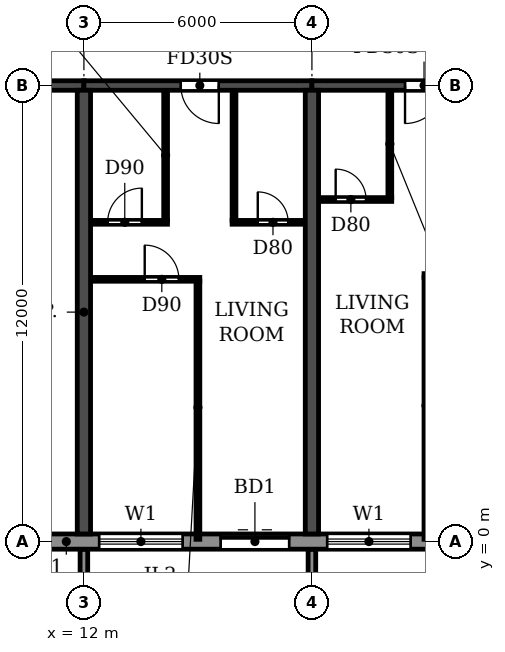
"""IFC4 building model, lengths in metres.
Left out: names, types, materials, properties, quantities, classifications, styles, units other than length and angle.
Written with IfcOpenShell. Run it as: python <this file> out.ifc"""

import sys

from ifc_helpers import new_model, si_unit, direction, frame, frame_2d, origin, place, context, subcontext, project, spatial, polyline, rectangle, outline, extrude, source, transform, mapped, element, fill, save


model = new_model("IFC4")
c1 = context("Model", 3, precision=1e-05, world=origin(), true_north=direction((0.0, 1.0)))
c2 = subcontext(c1, "Body", "Model", "MODEL_VIEW")
j1 = project(units=[si_unit("LENGTHUNIT", "METRE"), si_unit("PLANEANGLEUNIT", "RADIAN")], contexts=[c1])
p1 = place(None, origin())
s1 = spatial("IfcSite", under=j1, at=p1, CompositionType="ELEMENT")
p2 = place(p1, origin())
s2 = spatial("IfcBuilding", under=s1, at=p2, CompositionType="ELEMENT")
p3 = place(p2, frame((0.0, 0.0, 72.9)))
s3 = spatial("IfcBuildingStorey", under=s2, at=p3, CompositionType="ELEMENT", Elevation=72.9)
for number, where, z_axis, x_axis in (
    (1, (12.0, 0.2, 0.0), (0.0, 0.0, 1.0), (0.0, 1.0, 0.0)),
    (2, (18.0, 0.2, 0.0), (0.0, 0.0, 1.0), (0.0, 1.0, 0.0)),
):
    element("IfcWall", number, at=place(p3, frame(where, z_axis=z_axis, x_axis=x_axis)), inside=s3, PredefinedType="SHEAR", context=c2, shape_type="SweptSolid", body=[
        extrude(rectangle(XDim=11.675, YDim=0.35, at=frame_2d((5.837, 0.0))), origin(), (0.0, 0.0, 1.0), 3.06),
    ])
p4 = place(p3, frame((6.2, 12.0, 0.0), z_axis=(0.0, 0.0, 1.0), x_axis=(1.0, 0.0, 0.0)))
e3 = element("IfcWall", 3, at=p4, inside=s3, PredefinedType="SHEAR", context=c2, shape_type="SweptSolid", body=[
    extrude(rectangle(XDim=5.8, YDim=0.25, at=frame_2d((2.9, 0.0))), origin(), (0.0, 0.0, 1.0), 2.46),
])
p5 = place(p4, frame((2.3, 0.0, 0.0)))
e4 = element("IfcOpeningElement", 4, at=p5, cuts=e3, PredefinedType="OPENING", context=c2, shape_type="SweptSolid", body=[
    extrude(rectangle(XDim=1.0, YDim=2.1, at=frame_2d((0.5, 1.05))), frame((0.0, 0.135, 0.0), z_axis=(0.0, -1.0, 0.0), x_axis=(1.0, 0.0, 0.0)), (0.0, 0.0, 1.0), 0.27),
])
p6 = place(p3, frame((12.0, 12.0, 0.0), z_axis=(0.0, 0.0, 1.0), x_axis=(1.0, 0.0, 0.0)))
e5 = element("IfcWall", 5, at=p6, inside=s3, PredefinedType="SHEAR", context=c2, shape_type="SweptSolid", body=[
    extrude(rectangle(XDim=6.0, YDim=0.25, at=frame_2d((3.0, 0.0))), origin(), (0.0, 0.0, 1.0), 2.46),
])
p7 = place(p6, frame((2.55, 0.0, 0.0)))
e6 = element("IfcOpeningElement", 6, at=p7, cuts=e5, PredefinedType="OPENING", context=c2, shape_type="SweptSolid", body=[
    extrude(rectangle(XDim=1.0, YDim=2.1, at=frame_2d((0.5, 1.05))), frame((0.0, 0.135, 0.0), z_axis=(0.0, -1.0, 0.0), x_axis=(1.0, 0.0, 0.0)), (0.0, 0.0, 1.0), 0.27),
])
p8 = place(p3, frame((18.0, 12.0, 0.0), z_axis=(0.0, 0.0, 1.0), x_axis=(1.0, 0.0, 0.0)))
e7 = element("IfcWall", 7, at=p8, inside=s3, PredefinedType="SHEAR", context=c2, shape_type="SweptSolid", body=[
    extrude(rectangle(XDim=6.0, YDim=0.25, at=frame_2d((3.0, 0.0))), origin(), (0.0, 0.0, 1.0), 2.46),
])
p9 = place(p8, frame((2.45, 0.0, 0.0)))
e8 = element("IfcOpeningElement", 8, at=p9, cuts=e7, PredefinedType="OPENING", context=c2, shape_type="SweptSolid", body=[
    extrude(rectangle(XDim=1.0, YDim=2.1, at=frame_2d((0.5, 1.05))), frame((0.0, 0.135, 0.0), z_axis=(0.0, -1.0, 0.0), x_axis=(1.0, 0.0, 0.0)), (0.0, 0.0, 1.0), 0.27),
])
p10 = place(p3, frame((10.683, 0.0, 0.0), z_axis=(0.0, 0.0, 1.0), x_axis=(1.0, 0.0, 0.0)))
e9 = element("IfcWall", 9, at=p10, inside=s3, PredefinedType="STANDARD", context=c2, shape_type="SweptSolid", body=[
    extrude(rectangle(XDim=80.634, YDim=0.4, at=frame_2d((40.317, 0.0))), origin(), (0.0, 0.0, 1.0), 3.06),
])
p11 = place(p10, frame((1.717, 0.0, 0.9)))
e10 = element("IfcOpeningElement", 10, at=p11, cuts=e9, PredefinedType="OPENING", context=c2, shape_type="SweptSolid", body=[
    extrude(rectangle(XDim=2.2, YDim=1.5, at=frame_2d((1.1, 0.75))), frame((0.0, 0.21, 0.0), z_axis=(0.0, -1.0, 0.0), x_axis=(1.0, 0.0, 0.0)), (0.0, 0.0, 1.0), 0.42),
])
p12 = place(p10, frame((4.917, 0.0, 0.0)))
e11 = element("IfcOpeningElement", 11, at=p12, cuts=e9, PredefinedType="OPENING", context=c2, shape_type="SweptSolid", body=[
    extrude(rectangle(XDim=1.8, YDim=2.4, at=frame_2d((0.9, 1.2))), frame((0.0, 0.21, 0.0), z_axis=(0.0, -1.0, 0.0), x_axis=(1.0, 0.0, 0.0)), (0.0, 0.0, 1.0), 0.42),
])
p13 = place(p10, frame((7.717, 0.0, 0.9)))
e12 = element("IfcOpeningElement", 12, at=p13, cuts=e9, PredefinedType="OPENING", context=c2, shape_type="SweptSolid", body=[
    extrude(rectangle(XDim=2.2, YDim=1.5, at=frame_2d((1.1, 0.75))), frame((0.0, 0.21, 0.0), z_axis=(0.0, -1.0, 0.0), x_axis=(1.0, 0.0, 0.0)), (0.0, 0.0, 1.0), 0.42),
])
p14 = place(p10, frame((10.717, 0.0, 0.9)))
e13 = element("IfcOpeningElement", 13, at=p14, cuts=e9, PredefinedType="OPENING", context=c2, shape_type="SweptSolid", body=[
    extrude(rectangle(XDim=2.2, YDim=1.5, at=frame_2d((1.1, 0.75))), frame((0.0, 0.21, 0.0), z_axis=(0.0, -1.0, 0.0), x_axis=(1.0, 0.0, 0.0)), (0.0, 0.0, 1.0), 0.42),
])
p15 = place(p10, frame((13.717, 0.0, 0.9)))
e14 = element("IfcOpeningElement", 14, at=p15, cuts=e9, PredefinedType="OPENING", context=c2, shape_type="SweptSolid", body=[
    extrude(rectangle(XDim=2.2, YDim=1.5, at=frame_2d((1.1, 0.75))), frame((0.0, 0.21, 0.0), z_axis=(0.0, -1.0, 0.0), x_axis=(1.0, 0.0, 0.0)), (0.0, 0.0, 1.0), 0.42),
])
p16 = place(p10, frame((16.917, 0.0, 0.0)))
e15 = element("IfcOpeningElement", 15, at=p16, cuts=e9, PredefinedType="OPENING", context=c2, shape_type="SweptSolid", body=[
    extrude(rectangle(XDim=1.8, YDim=2.4, at=frame_2d((0.9, 1.2))), frame((0.0, 0.21, 0.0), z_axis=(0.0, -1.0, 0.0), x_axis=(1.0, 0.0, 0.0)), (0.0, 0.0, 1.0), 0.42),
])
p17 = place(p10, frame((19.717, 0.0, 0.9)))
e16 = element("IfcOpeningElement", 16, at=p17, cuts=e9, PredefinedType="OPENING", context=c2, shape_type="SweptSolid", body=[
    extrude(rectangle(XDim=2.2, YDim=1.5, at=frame_2d((1.1, 0.75))), frame((0.0, 0.21, 0.0), z_axis=(0.0, -1.0, 0.0), x_axis=(1.0, 0.0, 0.0)), (0.0, 0.0, 1.0), 0.42),
])
p18 = place(p10, frame((22.717, 0.0, 0.9)))
e17 = element("IfcOpeningElement", 17, at=p18, cuts=e9, PredefinedType="OPENING", context=c2, shape_type="SweptSolid", body=[
    extrude(rectangle(XDim=2.2, YDim=1.5, at=frame_2d((1.1, 0.75))), frame((0.0, 0.21, 0.0), z_axis=(0.0, -1.0, 0.0), x_axis=(1.0, 0.0, 0.0)), (0.0, 0.0, 1.0), 0.42),
])
p19 = place(p10, frame((25.917, 0.0, 0.0)))
e18 = element("IfcOpeningElement", 18, at=p19, cuts=e9, PredefinedType="OPENING", context=c2, shape_type="SweptSolid", body=[
    extrude(rectangle(XDim=1.8, YDim=2.4, at=frame_2d((0.9, 1.2))), frame((0.0, 0.21, 0.0), z_axis=(0.0, -1.0, 0.0), x_axis=(1.0, 0.0, 0.0)), (0.0, 0.0, 1.0), 0.42),
])
p20 = place(p10, frame((28.717, 0.0, 0.9)))
e19 = element("IfcOpeningElement", 19, at=p20, cuts=e9, PredefinedType="OPENING", context=c2, shape_type="SweptSolid", body=[
    extrude(rectangle(XDim=2.2, YDim=1.5, at=frame_2d((1.1, 0.75))), frame((0.0, 0.21, 0.0), z_axis=(0.0, -1.0, 0.0), x_axis=(1.0, 0.0, 0.0)), (0.0, 0.0, 1.0), 0.42),
])
p21 = place(p10, frame((31.717, 0.0, 0.9)))
e20 = element("IfcOpeningElement", 20, at=p21, cuts=e9, PredefinedType="OPENING", context=c2, shape_type="SweptSolid", body=[
    extrude(rectangle(XDim=2.2, YDim=1.5, at=frame_2d((1.1, 0.75))), frame((0.0, 0.21, 0.0), z_axis=(0.0, -1.0, 0.0), x_axis=(1.0, 0.0, 0.0)), (0.0, 0.0, 1.0), 0.42),
])
p22 = place(p10, frame((34.717, 0.0, 0.9)))
e21 = element("IfcOpeningElement", 21, at=p22, cuts=e9, PredefinedType="OPENING", context=c2, shape_type="SweptSolid", body=[
    extrude(rectangle(XDim=2.2, YDim=1.5, at=frame_2d((1.1, 0.75))), frame((0.0, 0.21, 0.0), z_axis=(0.0, -1.0, 0.0), x_axis=(1.0, 0.0, 0.0)), (0.0, 0.0, 1.0), 0.42),
])
p23 = place(p10, frame((37.917, 0.0, 0.0)))
e22 = element("IfcOpeningElement", 22, at=p23, cuts=e9, PredefinedType="OPENING", context=c2, shape_type="SweptSolid", body=[
    extrude(rectangle(XDim=1.8, YDim=2.4, at=frame_2d((0.9, 1.2))), frame((0.0, 0.21, 0.0), z_axis=(0.0, -1.0, 0.0), x_axis=(1.0, 0.0, 0.0)), (0.0, 0.0, 1.0), 0.42),
])
p24 = place(p10, frame((40.717, 0.0, 0.9)))
e23 = element("IfcOpeningElement", 23, at=p24, cuts=e9, PredefinedType="OPENING", context=c2, shape_type="SweptSolid", body=[
    extrude(rectangle(XDim=2.2, YDim=1.5, at=frame_2d((1.1, 0.75))), frame((0.0, 0.21, 0.0), z_axis=(0.0, -1.0, 0.0), x_axis=(1.0, 0.0, 0.0)), (0.0, 0.0, 1.0), 0.42),
])
p25 = place(p10, frame((43.717, 0.0, 0.9)))
e24 = element("IfcOpeningElement", 24, at=p25, cuts=e9, PredefinedType="OPENING", context=c2, shape_type="SweptSolid", body=[
    extrude(rectangle(XDim=2.2, YDim=1.5, at=frame_2d((1.1, 0.75))), frame((0.0, 0.21, 0.0), z_axis=(0.0, -1.0, 0.0), x_axis=(1.0, 0.0, 0.0)), (0.0, 0.0, 1.0), 0.42),
])
p26 = place(p10, frame((46.717, 0.0, 0.9)))
e25 = element("IfcOpeningElement", 25, at=p26, cuts=e9, PredefinedType="OPENING", context=c2, shape_type="SweptSolid", body=[
    extrude(rectangle(XDim=2.2, YDim=1.5, at=frame_2d((1.1, 0.75))), frame((0.0, 0.21, 0.0), z_axis=(0.0, -1.0, 0.0), x_axis=(1.0, 0.0, 0.0)), (0.0, 0.0, 1.0), 0.42),
])
p27 = place(p10, frame((49.917, 0.0, 0.0)))
e26 = element("IfcOpeningElement", 26, at=p27, cuts=e9, PredefinedType="OPENING", context=c2, shape_type="SweptSolid", body=[
    extrude(rectangle(XDim=1.8, YDim=2.4, at=frame_2d((0.9, 1.2))), frame((0.0, 0.21, 0.0), z_axis=(0.0, -1.0, 0.0), x_axis=(1.0, 0.0, 0.0)), (0.0, 0.0, 1.0), 0.42),
])
p28 = place(p10, frame((52.717, 0.0, 0.9)))
e27 = element("IfcOpeningElement", 27, at=p28, cuts=e9, PredefinedType="OPENING", context=c2, shape_type="SweptSolid", body=[
    extrude(rectangle(XDim=2.2, YDim=1.5, at=frame_2d((1.1, 0.75))), frame((0.0, 0.21, 0.0), z_axis=(0.0, -1.0, 0.0), x_axis=(1.0, 0.0, 0.0)), (0.0, 0.0, 1.0), 0.42),
])
p29 = place(p10, frame((55.717, 0.0, 0.9)))
e28 = element("IfcOpeningElement", 28, at=p29, cuts=e9, PredefinedType="OPENING", context=c2, shape_type="SweptSolid", body=[
    extrude(rectangle(XDim=2.2, YDim=1.5, at=frame_2d((1.1, 0.75))), frame((0.0, 0.21, 0.0), z_axis=(0.0, -1.0, 0.0), x_axis=(1.0, 0.0, 0.0)), (0.0, 0.0, 1.0), 0.42),
])
p30 = place(p10, frame((58.717, 0.0, 0.9)))
e29 = element("IfcOpeningElement", 29, at=p30, cuts=e9, PredefinedType="OPENING", context=c2, shape_type="SweptSolid", body=[
    extrude(rectangle(XDim=2.2, YDim=1.5, at=frame_2d((1.1, 0.75))), frame((0.0, 0.21, 0.0), z_axis=(0.0, -1.0, 0.0), x_axis=(1.0, 0.0, 0.0)), (0.0, 0.0, 1.0), 0.42),
])
p31 = place(p10, frame((61.717, 0.0, 0.9)))
e30 = element("IfcOpeningElement", 30, at=p31, cuts=e9, PredefinedType="OPENING", context=c2, shape_type="SweptSolid", body=[
    extrude(rectangle(XDim=2.2, YDim=1.5, at=frame_2d((1.1, 0.75))), frame((0.0, 0.21, 0.0), z_axis=(0.0, -1.0, 0.0), x_axis=(1.0, 0.0, 0.0)), (0.0, 0.0, 1.0), 0.42),
])
p32 = place(p10, frame((64.917, 0.0, 0.0)))
e31 = element("IfcOpeningElement", 31, at=p32, cuts=e9, PredefinedType="OPENING", context=c2, shape_type="SweptSolid", body=[
    extrude(rectangle(XDim=1.8, YDim=2.4, at=frame_2d((0.9, 1.2))), frame((0.0, 0.21, 0.0), z_axis=(0.0, -1.0, 0.0), x_axis=(1.0, 0.0, 0.0)), (0.0, 0.0, 1.0), 0.42),
])
p33 = place(p10, frame((67.717, 0.0, 0.9)))
e32 = element("IfcOpeningElement", 32, at=p33, cuts=e9, PredefinedType="OPENING", context=c2, shape_type="SweptSolid", body=[
    extrude(rectangle(XDim=2.2, YDim=1.5, at=frame_2d((1.1, 0.75))), frame((0.0, 0.21, 0.0), z_axis=(0.0, -1.0, 0.0), x_axis=(1.0, 0.0, 0.0)), (0.0, 0.0, 1.0), 0.42),
])
p34 = place(p10, frame((70.717, 0.0, 0.9)))
e33 = element("IfcOpeningElement", 33, at=p34, cuts=e9, PredefinedType="OPENING", context=c2, shape_type="SweptSolid", body=[
    extrude(rectangle(XDim=2.2, YDim=1.5, at=frame_2d((1.1, 0.75))), frame((0.0, 0.21, 0.0), z_axis=(0.0, -1.0, 0.0), x_axis=(1.0, 0.0, 0.0)), (0.0, 0.0, 1.0), 0.42),
])
p35 = place(p10, frame((73.917, 0.0, 0.0)))
e34 = element("IfcOpeningElement", 34, at=p35, cuts=e9, PredefinedType="OPENING", context=c2, shape_type="SweptSolid", body=[
    extrude(rectangle(XDim=1.8, YDim=2.4, at=frame_2d((0.9, 1.2))), frame((0.0, 0.21, 0.0), z_axis=(0.0, -1.0, 0.0), x_axis=(1.0, 0.0, 0.0)), (0.0, 0.0, 1.0), 0.42),
])
p36 = place(p10, frame((76.717, 0.0, 0.9)))
e35 = element("IfcOpeningElement", 35, at=p36, cuts=e9, PredefinedType="OPENING", context=c2, shape_type="SweptSolid", body=[
    extrude(rectangle(XDim=2.2, YDim=1.5, at=frame_2d((1.1, 0.75))), frame((0.0, 0.21, 0.0), z_axis=(0.0, -1.0, 0.0), x_axis=(1.0, 0.0, 0.0)), (0.0, 0.0, 1.0), 0.42),
])
m1 = source(origin(), c2, "Body", "SweptSolid", [
    extrude(outline(polyline([(0.0, 0.0), (0.2, 0.0), (0.2, 1.65), (0.0, 1.65), (0.0, 0.0)])), origin(), (0.0, 0.0, 1.0), 3.1),
])
for number, where in (
    (36, (11.9, -1.85, 0.0)),
    (37, (17.9, -1.85, 0.0)),
):
    element("IfcWall", number, at=place(p3, frame(where)), inside=s3, PredefinedType="STANDARD", context=c2, shape_type="MappedRepresentation", body=[
        mapped(m1, transform((0.0, 0.0, 0.0))),
    ])
p37 = place(p3, frame((12.185, 6.9, 0.0), z_axis=(0.0, 0.0, 1.0), x_axis=(1.0, 0.0, 0.0)))
e38 = element("IfcWall", 38, at=p37, inside=s3, PredefinedType="PARTITIONING", context=c2, shape_type="SweptSolid", body=[
    extrude(rectangle(XDim=2.865, YDim=0.1, at=frame_2d((1.433, 0.0))), origin(), (0.0, 0.0, 1.0), 3.06),
])
p38 = place(p37, frame((1.415, 0.0, 0.0)))
e39 = element("IfcOpeningElement", 39, at=p38, cuts=e38, PredefinedType="OPENING", context=c2, shape_type="SweptSolid", body=[
    extrude(rectangle(XDim=0.9, YDim=2.1, at=frame_2d((0.45, 1.05))), frame((0.0, 0.06, 0.0), z_axis=(0.0, -1.0, 0.0), x_axis=(1.0, 0.0, 0.0)), (0.0, 0.0, 1.0), 0.12),
])
p39 = place(p3, frame((20.95, 7.0, 0.0), z_axis=(0.0, 0.0, 1.0), x_axis=(1.0, 0.0, 0.0)))
e40 = element("IfcWall", 40, at=p39, inside=s3, PredefinedType="PARTITIONING", context=c2, shape_type="SweptSolid", body=[
    extrude(rectangle(XDim=2.865, YDim=0.1, at=frame_2d((1.433, 0.0))), origin(), (0.0, 0.0, 1.0), 3.06),
])
p40 = place(p39, frame((1.65, 0.0, 0.0)))
e41 = element("IfcOpeningElement", 41, at=p40, cuts=e40, PredefinedType="OPENING", context=c2, shape_type="SweptSolid", body=[
    extrude(rectangle(XDim=0.9, YDim=2.1, at=frame_2d((0.45, 1.05))), frame((0.0, 0.06, 0.0), z_axis=(0.0, -1.0, 0.0), x_axis=(1.0, 0.0, 0.0)), (0.0, 0.0, 1.0), 0.12),
])
p41 = place(p3, frame((12.185, 8.4, 0.0), z_axis=(0.0, 0.0, 1.0), x_axis=(1.0, 0.0, 0.0)))
e42 = element("IfcWall", 42, at=p41, inside=s3, PredefinedType="PARTITIONING", context=c2, shape_type="SweptSolid", body=[
    extrude(rectangle(XDim=2.015, YDim=0.1, at=frame_2d((1.007, 0.0))), origin(), (0.0, 0.0, 1.0), 3.06),
])
p42 = place(p41, frame((0.44, 0.0, 0.0)))
e43 = element("IfcOpeningElement", 43, at=p42, cuts=e42, PredefinedType="OPENING", context=c2, shape_type="SweptSolid", body=[
    extrude(rectangle(XDim=0.9, YDim=2.1, at=frame_2d((0.45, 1.05))), frame((0.0, 0.06, 0.0), z_axis=(0.0, -1.0, 0.0), x_axis=(1.0, 0.0, 0.0)), (0.0, 0.0, 1.0), 0.12),
])
p43 = place(p3, frame((15.9, 8.4, 0.0), z_axis=(0.0, 0.0, 1.0), x_axis=(1.0, 0.0, 0.0)))
e44 = element("IfcWall", 44, at=p43, inside=s3, PredefinedType="PARTITIONING", context=c2, shape_type="SweptSolid", body=[
    extrude(rectangle(XDim=1.915, YDim=0.1, at=frame_2d((0.958, 0.0))), origin(), (0.0, 0.0, 1.0), 3.06),
])
p44 = place(p43, frame((0.675, 0.0, 0.0)))
e45 = element("IfcOpeningElement", 45, at=p44, cuts=e44, PredefinedType="OPENING", context=c2, shape_type="SweptSolid", body=[
    extrude(rectangle(XDim=0.8, YDim=2.1, at=frame_2d((0.4, 1.05))), frame((0.0, 0.06, 0.0), z_axis=(0.0, -1.0, 0.0), x_axis=(1.0, 0.0, 0.0)), (0.0, 0.0, 1.0), 0.12),
])
p45 = place(p3, frame((18.185, 9.0, 0.0), z_axis=(0.0, 0.0, 1.0), x_axis=(1.0, 0.0, 0.0)))
e46 = element("IfcWall", 46, at=p45, inside=s3, PredefinedType="PARTITIONING", context=c2, shape_type="SweptSolid", body=[
    extrude(rectangle(XDim=1.915, YDim=0.1, at=frame_2d((0.958, 0.0))), origin(), (0.0, 0.0, 1.0), 3.06),
])
p46 = place(p45, frame((0.44, 0.0, 0.0)))
e47 = element("IfcOpeningElement", 47, at=p46, cuts=e46, PredefinedType="OPENING", context=c2, shape_type="SweptSolid", body=[
    extrude(rectangle(XDim=0.8, YDim=2.1, at=frame_2d((0.4, 1.05))), frame((0.0, 0.06, 0.0), z_axis=(0.0, -1.0, 0.0), x_axis=(1.0, 0.0, 0.0)), (0.0, 0.0, 1.0), 0.12),
])
p47 = place(p3, frame((14.15, 8.45, 0.0), z_axis=(0.0, 0.0, 1.0), x_axis=(0.0, 1.0, 0.0)))
e48 = element("IfcWall", 48, at=p47, inside=s3, PredefinedType="PARTITIONING", context=c2, shape_type="SweptSolid", body=[
    extrude(rectangle(XDim=3.415, YDim=0.1, at=frame_2d((1.708, 0.0))), origin(), (0.0, 0.0, 1.0), 3.06),
])
p48 = place(p3, frame((15.0, 0.06, 0.0), z_axis=(0.0, 0.0, 1.0), x_axis=(0.0, 1.0, 0.0)))
e49 = element("IfcWall", 49, at=p48, inside=s3, PredefinedType="PARTITIONING", context=c2, shape_type="SweptSolid", body=[
    extrude(rectangle(XDim=6.79, YDim=0.1, at=frame_2d((3.395, 0.0))), origin(), (0.0, 0.0, 1.0), 3.06),
])
p49 = place(p3, frame((15.95, 8.45, 0.0), z_axis=(0.0, 0.0, 1.0), x_axis=(0.0, 1.0, 0.0)))
e50 = element("IfcWall", 50, at=p49, inside=s3, PredefinedType="PARTITIONING", context=c2, shape_type="SweptSolid", body=[
    extrude(rectangle(XDim=3.415, YDim=0.1, at=frame_2d((1.708, 0.0))), origin(), (0.0, 0.0, 1.0), 3.06),
])
p50 = place(p3, frame((20.05, 9.05, 0.0), z_axis=(0.0, 0.0, 1.0), x_axis=(0.0, 1.0, 0.0)))
e51 = element("IfcWall", 51, at=p50, inside=s3, PredefinedType="PARTITIONING", context=c2, shape_type="SweptSolid", body=[
    extrude(rectangle(XDim=2.815, YDim=0.1, at=frame_2d((1.407, 0.0))), origin(), (0.0, 0.0, 1.0), 3.06),
])
p51 = place(p3, frame((21.0, 0.06, 0.0), z_axis=(0.0, 0.0, 1.0), x_axis=(0.0, 1.0, 0.0)))
e52 = element("IfcWall", 52, at=p51, inside=s3, PredefinedType="PARTITIONING", context=c2, shape_type="SweptSolid", body=[
    extrude(rectangle(XDim=6.89, YDim=0.1, at=frame_2d((3.445, 0.0))), origin(), (0.0, 0.0, 1.0), 3.06),
])
p52 = place(p11, origin())
e53 = element("IfcWindow", 53, at=p52, inside=s3, PartitioningType="DOUBLE_PANEL_HORIZONTAL", PredefinedType="WINDOW", context=c2, shape_type="SweptSolid", body=[
    extrude(rectangle(XDim=2.2, YDim=1.5, at=frame_2d((1.1, 0.75))), frame((0.0, 0.03, 0.0), z_axis=(0.0, -1.0, 0.0), x_axis=(1.0, 0.0, 0.0)), (0.0, 0.0, 1.0), 0.06),
])
fill(e10, e53)
p53 = place(p12, origin())
e54 = element("IfcDoor", 54, at=p53, inside=s3, OperationType="DOUBLE_DOOR_SLIDING", PredefinedType="DOOR", context=c2, shape_type="SweptSolid", body=[
    extrude(rectangle(XDim=1.8, YDim=2.4, at=frame_2d((0.9, 1.2))), frame((0.0, 0.025, 0.0), z_axis=(0.0, -1.0, 0.0), x_axis=(1.0, 0.0, 0.0)), (0.0, 0.0, 1.0), 0.05),
])
fill(e11, e54)
p54 = place(p13, origin())
e55 = element("IfcWindow", 55, at=p54, inside=s3, PartitioningType="DOUBLE_PANEL_HORIZONTAL", PredefinedType="WINDOW", context=c2, shape_type="SweptSolid", body=[
    extrude(rectangle(XDim=2.2, YDim=1.5, at=frame_2d((1.1, 0.75))), frame((0.0, 0.03, 0.0), z_axis=(0.0, -1.0, 0.0), x_axis=(1.0, 0.0, 0.0)), (0.0, 0.0, 1.0), 0.06),
])
fill(e12, e55)
p55 = place(p42, origin())
e56 = element("IfcDoor", 56, at=p55, inside=s3, OperationType="SINGLE_SWING_RIGHT", PredefinedType="DOOR", context=c2, shape_type="SweptSolid", body=[
    extrude(rectangle(XDim=0.9, YDim=2.1, at=frame_2d((0.45, 1.05))), frame((0.0, 0.025, 0.0), z_axis=(0.0, -1.0, 0.0), x_axis=(1.0, 0.0, 0.0)), (0.0, 0.0, 1.0), 0.05),
])
fill(e43, e56)
p56 = place(p38, origin())
e57 = element("IfcDoor", 57, at=p56, inside=s3, OperationType="SINGLE_SWING_LEFT", PredefinedType="DOOR", context=c2, shape_type="SweptSolid", body=[
    extrude(rectangle(XDim=0.9, YDim=2.1, at=frame_2d((0.45, 1.05))), frame((0.0, 0.025, 0.0), z_axis=(0.0, -1.0, 0.0), x_axis=(1.0, 0.0, 0.0)), (0.0, 0.0, 1.0), 0.05),
])
fill(e39, e57)
p57 = place(p7, frame((1.0, 0.0, 0.0), z_axis=(0.0, 0.0, 1.0), x_axis=(-1.0, 0.0, 0.0)))
e58 = element("IfcDoor", 58, at=p57, inside=s3, OperationType="SINGLE_SWING_LEFT", PredefinedType="DOOR", context=c2, shape_type="SweptSolid", body=[
    extrude(rectangle(XDim=1.0, YDim=2.1, at=frame_2d((0.5, 1.05))), frame((0.0, 0.025, 0.0), z_axis=(0.0, -1.0, 0.0), x_axis=(1.0, 0.0, 0.0)), (0.0, 0.0, 1.0), 0.05),
])
fill(e6, e58)
p58 = place(p44, origin())
e59 = element("IfcDoor", 59, at=p58, inside=s3, OperationType="SINGLE_SWING_LEFT", PredefinedType="DOOR", context=c2, shape_type="SweptSolid", body=[
    extrude(rectangle(XDim=0.8, YDim=2.1, at=frame_2d((0.4, 1.05))), frame((0.0, 0.025, 0.0), z_axis=(0.0, -1.0, 0.0), x_axis=(1.0, 0.0, 0.0)), (0.0, 0.0, 1.0), 0.05),
])
fill(e45, e59)
p59 = place(p46, origin())
e60 = element("IfcDoor", 60, at=p59, inside=s3, OperationType="SINGLE_SWING_LEFT", PredefinedType="DOOR", context=c2, shape_type="SweptSolid", body=[
    extrude(rectangle(XDim=0.8, YDim=2.1, at=frame_2d((0.4, 1.05))), frame((0.0, 0.025, 0.0), z_axis=(0.0, -1.0, 0.0), x_axis=(1.0, 0.0, 0.0)), (0.0, 0.0, 1.0), 0.05),
])
fill(e47, e60)
p60 = place(p9, frame((1.0, 0.0, 0.0), z_axis=(0.0, 0.0, 1.0), x_axis=(-1.0, 0.0, 0.0)))
e61 = element("IfcDoor", 61, at=p60, inside=s3, OperationType="SINGLE_SWING_RIGHT", PredefinedType="DOOR", context=c2, shape_type="SweptSolid", body=[
    extrude(rectangle(XDim=1.0, YDim=2.1, at=frame_2d((0.5, 1.05))), frame((0.0, 0.025, 0.0), z_axis=(0.0, -1.0, 0.0), x_axis=(1.0, 0.0, 0.0)), (0.0, 0.0, 1.0), 0.05),
])
fill(e8, e61)
save(model, sys.argv[1])
